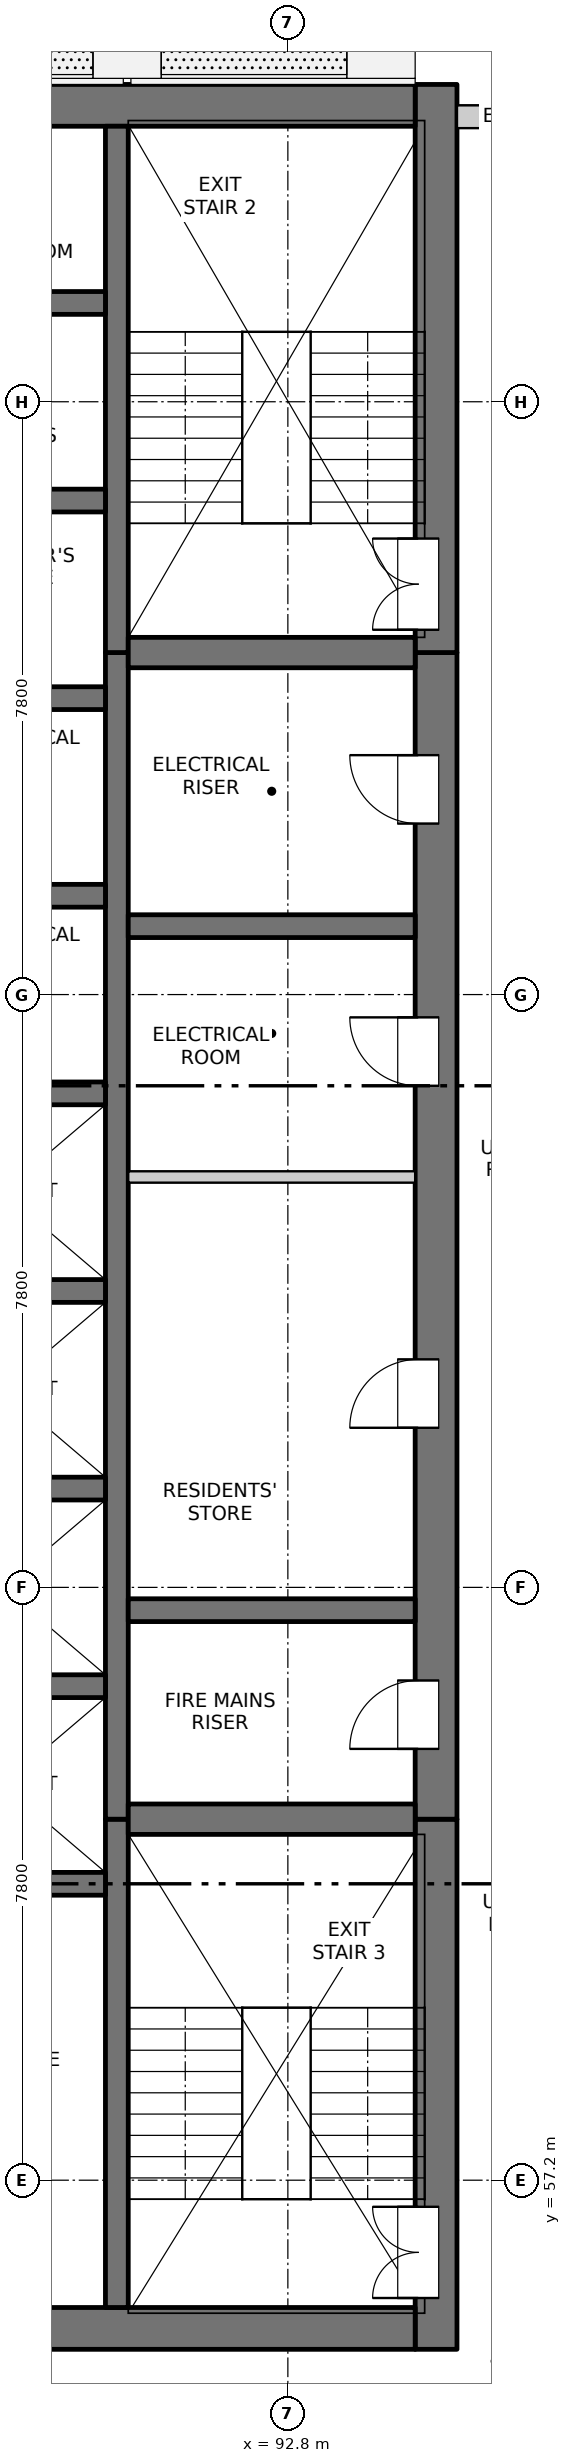
"""IFC4 building model, lengths in metres.
Left out: names, types, materials, properties, quantities, classifications, styles, units other than length and angle.
Written with IfcOpenShell. Run it as: python <this file> out.ifc"""

import sys

from ifc_helpers import new_model, si_unit, direction, frame, frame_2d, origin, place, context, subcontext, project, spatial, rectangle, extrude, element, fill, save


model = new_model("IFC4")
c1 = context("Model", 3, precision=1e-05, world=origin(), true_north=direction((0.0, 1.0)))
c2 = subcontext(c1, "Body", "Model", "MODEL_VIEW")
j1 = project(units=[si_unit("LENGTHUNIT", "METRE"), si_unit("PLANEANGLEUNIT", "RADIAN")], contexts=[c1])
p1 = place(None, origin())
s1 = spatial("IfcSite", under=j1, at=p1, CompositionType="ELEMENT")
p2 = place(p1, origin())
s2 = spatial("IfcBuilding", under=s1, at=p2, CompositionType="ELEMENT")
p3 = place(p2, frame((0.0, 0.0, 127.1)))
s3 = spatial("IfcBuildingStorey", under=s2, at=p3, CompositionType="ELEMENT", Elevation=127.1)
p4 = place(p3, frame((94.75, 54.975, -0.25), z_axis=(0.0, 0.0, 1.0), x_axis=(0.0, 1.0, 0.0)))
e1 = element("IfcWall", 1, at=p4, inside=s3, PredefinedType="SOLIDWALL", context=c2, shape_type="SweptSolid", body=[
    extrude(rectangle(XDim=6.975, YDim=0.55, at=frame_2d((3.487, 0.0))), origin(), (0.0, 0.0, 1.0), 3.4),
])
p5 = place(p4, frame((0.675, 0.0, 0.25)))
e2 = element("IfcOpeningElement", 2, at=p5, cuts=e1, PredefinedType="OPENING", context=c2, shape_type="SweptSolid", body=[
    extrude(rectangle(XDim=1.2, YDim=2.1, at=frame_2d((0.6, 1.05))), frame((0.0, 0.285, 0.0), z_axis=(0.0, -1.0, 0.0), x_axis=(1.0, 0.0, 0.0)), (0.0, 0.0, 1.0), 0.57),
])
p6 = place(p3, frame((94.75, 61.95, -0.25), z_axis=(0.0, 0.0, 1.0), x_axis=(0.0, 1.0, 0.0)))
e3 = element("IfcWall", 3, at=p6, inside=s3, PredefinedType="SOLIDWALL", context=c2, shape_type="SweptSolid", body=[
    extrude(rectangle(XDim=15.35, YDim=0.55, at=frame_2d((7.675, 0.0))), origin(), (0.0, 0.0, 1.0), 3.4),
])
p7 = place(p6, frame((0.925, 0.0, 0.25)))
e4 = element("IfcOpeningElement", 4, at=p7, cuts=e3, PredefinedType="OPENING", context=c2, shape_type="SweptSolid", body=[
    extrude(rectangle(XDim=0.9, YDim=2.1, at=frame_2d((0.45, 1.05))), frame((0.0, 0.285, 0.0), z_axis=(0.0, -1.0, 0.0), x_axis=(1.0, 0.0, 0.0)), (0.0, 0.0, 1.0), 0.57),
])
p8 = place(p6, frame((5.15, 0.0, 0.25)))
e5 = element("IfcOpeningElement", 5, at=p8, cuts=e3, PredefinedType="OPENING", context=c2, shape_type="SweptSolid", body=[
    extrude(rectangle(XDim=0.9, YDim=2.1, at=frame_2d((0.45, 1.05))), frame((0.0, 0.285, 0.0), z_axis=(0.0, -1.0, 0.0), x_axis=(1.0, 0.0, 0.0)), (0.0, 0.0, 1.0), 0.57),
])
p9 = place(p6, frame((9.65, 0.0, 0.25)))
e6 = element("IfcOpeningElement", 6, at=p9, cuts=e3, PredefinedType="OPENING", context=c2, shape_type="SweptSolid", body=[
    extrude(rectangle(XDim=0.9, YDim=2.1, at=frame_2d((0.45, 1.05))), frame((0.0, 0.285, 0.0), z_axis=(0.0, -1.0, 0.0), x_axis=(1.0, 0.0, 0.0)), (0.0, 0.0, 1.0), 0.57),
])
p10 = place(p6, frame((13.1, 0.0, 0.25)))
e7 = element("IfcOpeningElement", 7, at=p10, cuts=e3, PredefinedType="OPENING", context=c2, shape_type="SweptSolid", body=[
    extrude(rectangle(XDim=0.9, YDim=2.1, at=frame_2d((0.45, 1.05))), frame((0.0, 0.285, 0.0), z_axis=(0.0, -1.0, 0.0), x_axis=(1.0, 0.0, 0.0)), (0.0, 0.0, 1.0), 0.57),
])
p11 = place(p3, frame((94.75, 77.3, -0.25), z_axis=(0.0, 0.0, 1.0), x_axis=(0.0, 1.0, 0.0)))
e8 = element("IfcWall", 8, at=p11, inside=s3, PredefinedType="SOLIDWALL", context=c2, shape_type="SweptSolid", body=[
    extrude(rectangle(XDim=7.475, YDim=0.55, at=frame_2d((3.737, 0.0))), origin(), (0.0, 0.0, 1.0), 3.4),
])
p12 = place(p11, frame((0.3, 0.0, 0.25)))
e9 = element("IfcOpeningElement", 9, at=p12, cuts=e8, PredefinedType="OPENING", context=c2, shape_type="SweptSolid", body=[
    extrude(rectangle(XDim=1.2, YDim=2.1, at=frame_2d((0.6, 1.05))), frame((0.0, 0.285, 0.0), z_axis=(0.0, -1.0, 0.0), x_axis=(1.0, 0.0, 0.0)), (0.0, 0.0, 1.0), 0.57),
])
p13 = place(p3, frame((75.525, 55.25, -0.25), z_axis=(0.0, 0.0, 1.0), x_axis=(1.0, 0.0, 0.0)))
e10 = element("IfcWall", 10, at=p13, inside=s3, PredefinedType="SOLIDWALL", context=c2, shape_type="SweptSolid", body=[
    extrude(rectangle(XDim=18.95, YDim=0.55, at=frame_2d((9.475, 0.0))), origin(), (0.0, 0.0, 1.0), 3.4),
])
p14 = place(p13, frame((8.725, 0.0, 0.25)))
e11 = element("IfcOpeningElement", 11, at=p14, cuts=e10, PredefinedType="OPENING", context=c2, shape_type="SweptSolid", body=[
    extrude(rectangle(XDim=1.5, YDim=2.1, at=frame_2d((0.75, 1.05))), frame((0.0, 0.285, 0.0), z_axis=(0.0, -1.0, 0.0), x_axis=(1.0, 0.0, 0.0)), (0.0, 0.0, 1.0), 0.57),
])
p15 = place(p3, frame((75.525, 84.5, -0.25), z_axis=(0.0, 0.0, 1.0), x_axis=(1.0, 0.0, 0.0)))
e12 = element("IfcWall", 12, at=p15, inside=s3, PredefinedType="SOLIDWALL", context=c2, shape_type="SweptSolid", body=[
    extrude(rectangle(XDim=18.95, YDim=0.55, at=frame_2d((9.475, 0.0))), origin(), (0.0, 0.0, 1.0), 3.4),
])
p16 = place(p3, frame((90.55, 55.525, -0.25), z_axis=(0.0, 0.0, 1.0), x_axis=(0.0, 1.0, 0.0)))
e13 = element("IfcWall", 13, at=p16, inside=s3, PredefinedType="SOLIDWALL", context=c2, shape_type="SweptSolid", body=[
    extrude(rectangle(XDim=6.425, YDim=0.3, at=frame_2d((3.212, 0.0))), origin(), (0.0, 0.0, 1.0), 3.4),
])
p17 = place(p3, frame((90.55, 61.95, -0.25), z_axis=(0.0, 0.0, 1.0), x_axis=(0.0, 1.0, 0.0)))
e14 = element("IfcWall", 14, at=p17, inside=s3, PredefinedType="SOLIDWALL", context=c2, shape_type="SweptSolid", body=[
    extrude(rectangle(XDim=15.35, YDim=0.3, at=frame_2d((7.675, 0.0))), origin(), (0.0, 0.0, 1.0), 3.4),
])
p18 = place(p3, frame((90.55, 77.3, -0.25), z_axis=(0.0, 0.0, 1.0), x_axis=(0.0, 1.0, 0.0)))
e15 = element("IfcWall", 15, at=p18, inside=s3, PredefinedType="SOLIDWALL", context=c2, shape_type="SweptSolid", body=[
    extrude(rectangle(XDim=6.925, YDim=0.3, at=frame_2d((3.462, 0.0))), origin(), (0.0, 0.0, 1.0), 3.4),
])
for number, where, z_axis, x_axis in (
    (16, (87.4, 61.1, -0.25), (0.0, 0.0, 1.0), (1.0, 0.0, 0.0)),
    (17, (87.4, 63.7, -0.25), (0.0, 0.0, 1.0), (1.0, 0.0, 0.0)),
    (18, (87.4, 66.3, -0.25), (0.0, 0.0, 1.0), (1.0, 0.0, 0.0)),
    (19, (87.4, 68.9, -0.25), (0.0, 0.0, 1.0), (1.0, 0.0, 0.0)),
    (20, (87.4, 71.5, -0.25), (0.0, 0.0, 1.0), (1.0, 0.0, 0.0)),
    (21, (87.4, 74.1, -0.25), (0.0, 0.0, 1.0), (1.0, 0.0, 0.0)),
    (22, (87.4, 76.7, -0.25), (0.0, 0.0, 1.0), (1.0, 0.0, 0.0)),
    (23, (87.4, 79.3, -0.25), (0.0, 0.0, 1.0), (1.0, 0.0, 0.0)),
    (24, (87.4, 81.9, -0.25), (0.0, 0.0, 1.0), (1.0, 0.0, 0.0)),
):
    element("IfcWall", number, at=place(p3, frame(where, z_axis=z_axis, x_axis=x_axis)), inside=s3, PredefinedType="SOLIDWALL", context=c2, shape_type="SweptSolid", body=[
        extrude(rectangle(XDim=3.0, YDim=0.3, at=frame_2d((1.5, 0.0))), origin(), (0.0, 0.0, 1.0), 3.4),
    ])
p19 = place(p3, frame((90.7, 61.95, -0.25), z_axis=(0.0, 0.0, 1.0), x_axis=(1.0, 0.0, 0.0)))
e25 = element("IfcWall", 25, at=p19, inside=s3, PredefinedType="SOLIDWALL", context=c2, shape_type="SweptSolid", body=[
    extrude(rectangle(XDim=3.775, YDim=0.4, at=frame_2d((1.888, 0.0))), origin(), (0.0, 0.0, 1.0), 3.4),
])
for number, where, z_axis, x_axis in (
    (26, (90.7, 64.7, -0.25), (0.0, 0.0, 1.0), (1.0, 0.0, 0.0)),
    (27, (90.7, 73.7, -0.25), (0.0, 0.0, 1.0), (1.0, 0.0, 0.0)),
):
    element("IfcWall", number, at=place(p3, frame(where, z_axis=z_axis, x_axis=x_axis)), inside=s3, PredefinedType="SOLIDWALL", context=c2, shape_type="SweptSolid", body=[
        extrude(rectangle(XDim=3.775, YDim=0.3, at=frame_2d((1.888, 0.0))), origin(), (0.0, 0.0, 1.0), 3.4),
    ])
p20 = place(p3, frame((90.7, 77.3, -0.25), z_axis=(0.0, 0.0, 1.0), x_axis=(1.0, 0.0, 0.0)))
e28 = element("IfcWall", 28, at=p20, inside=s3, PredefinedType="SOLIDWALL", context=c2, shape_type="SweptSolid", body=[
    extrude(rectangle(XDim=3.775, YDim=0.4, at=frame_2d((1.888, 0.0))), origin(), (0.0, 0.0, 1.0), 3.4),
])
p21 = place(p3, frame((95.025, 84.35, 0.0), z_axis=(0.0, 0.0, 1.0), x_axis=(1.0, 0.0, 0.0)))
e29 = element("IfcWall", 29, at=p21, inside=s3, PredefinedType="SOLIDWALL", context=c2, shape_type="SweptSolid", body=[
    extrude(rectangle(XDim=1.25, YDim=0.3, at=frame_2d((0.625, 0.0))), origin(), (0.0, 0.0, 1.0), 2.7),
])
p22 = place(p3, frame((90.7, 70.4, 0.0), z_axis=(0.0, 0.0, 1.0), x_axis=(1.0, 0.0, 0.0)))
e30 = element("IfcWall", 30, at=p22, inside=s3, PredefinedType="PARTITIONING", context=c2, shape_type="SweptSolid", body=[
    extrude(rectangle(XDim=3.775, YDim=0.15, at=frame_2d((1.887, 0.0))), origin(), (0.0, 0.0, 1.0), 3.15),
])
p23 = place(p5, origin())
e31 = element("IfcDoor", 31, at=p23, inside=s3, OperationType="DOUBLE_DOOR_SINGLE_SWING", PredefinedType="DOOR", context=c2, shape_type="SweptSolid", body=[
    extrude(rectangle(XDim=1.2, YDim=2.1, at=frame_2d((0.6, 1.05))), frame((0.0, 0.26, 0.0), z_axis=(0.0, -1.0, 0.0), x_axis=(1.0, 0.0, 0.0)), (0.0, 0.0, 1.0), 0.05),
])
fill(e2, e31)
p24 = place(p7, origin())
e32 = element("IfcDoor", 32, at=p24, inside=s3, OperationType="SINGLE_SWING_LEFT", PredefinedType="DOOR", context=c2, shape_type="SweptSolid", body=[
    extrude(rectangle(XDim=0.9, YDim=2.1, at=frame_2d((0.45, 1.05))), frame((0.0, 0.26, 0.0), z_axis=(0.0, -1.0, 0.0), x_axis=(1.0, 0.0, 0.0)), (0.0, 0.0, 1.0), 0.05),
])
fill(e4, e32)
p25 = place(p8, origin())
e33 = element("IfcDoor", 33, at=p25, inside=s3, OperationType="SINGLE_SWING_LEFT", PredefinedType="DOOR", context=c2, shape_type="SweptSolid", body=[
    extrude(rectangle(XDim=0.9, YDim=2.1, at=frame_2d((0.45, 1.05))), frame((0.0, 0.26, 0.0), z_axis=(0.0, -1.0, 0.0), x_axis=(1.0, 0.0, 0.0)), (0.0, 0.0, 1.0), 0.05),
])
fill(e5, e33)
p26 = place(p9, origin())
e34 = element("IfcDoor", 34, at=p26, inside=s3, OperationType="SINGLE_SWING_RIGHT", PredefinedType="DOOR", context=c2, shape_type="SweptSolid", body=[
    extrude(rectangle(XDim=0.9, YDim=2.1, at=frame_2d((0.45, 1.05))), frame((0.0, 0.26, 0.0), z_axis=(0.0, -1.0, 0.0), x_axis=(1.0, 0.0, 0.0)), (0.0, 0.0, 1.0), 0.05),
])
fill(e6, e34)
p27 = place(p10, origin())
e35 = element("IfcDoor", 35, at=p27, inside=s3, OperationType="SINGLE_SWING_RIGHT", PredefinedType="DOOR", context=c2, shape_type="SweptSolid", body=[
    extrude(rectangle(XDim=0.9, YDim=2.1, at=frame_2d((0.45, 1.05))), frame((0.0, 0.26, 0.0), z_axis=(0.0, -1.0, 0.0), x_axis=(1.0, 0.0, 0.0)), (0.0, 0.0, 1.0), 0.05),
])
fill(e7, e35)
p28 = place(p12, origin())
e36 = element("IfcDoor", 36, at=p28, inside=s3, OperationType="DOUBLE_DOOR_SINGLE_SWING", PredefinedType="DOOR", context=c2, shape_type="SweptSolid", body=[
    extrude(rectangle(XDim=1.2, YDim=2.1, at=frame_2d((0.6, 1.05))), frame((0.0, 0.26, 0.0), z_axis=(0.0, -1.0, 0.0), x_axis=(1.0, 0.0, 0.0)), (0.0, 0.0, 1.0), 0.05),
])
fill(e9, e36)
save(model, sys.argv[1])
